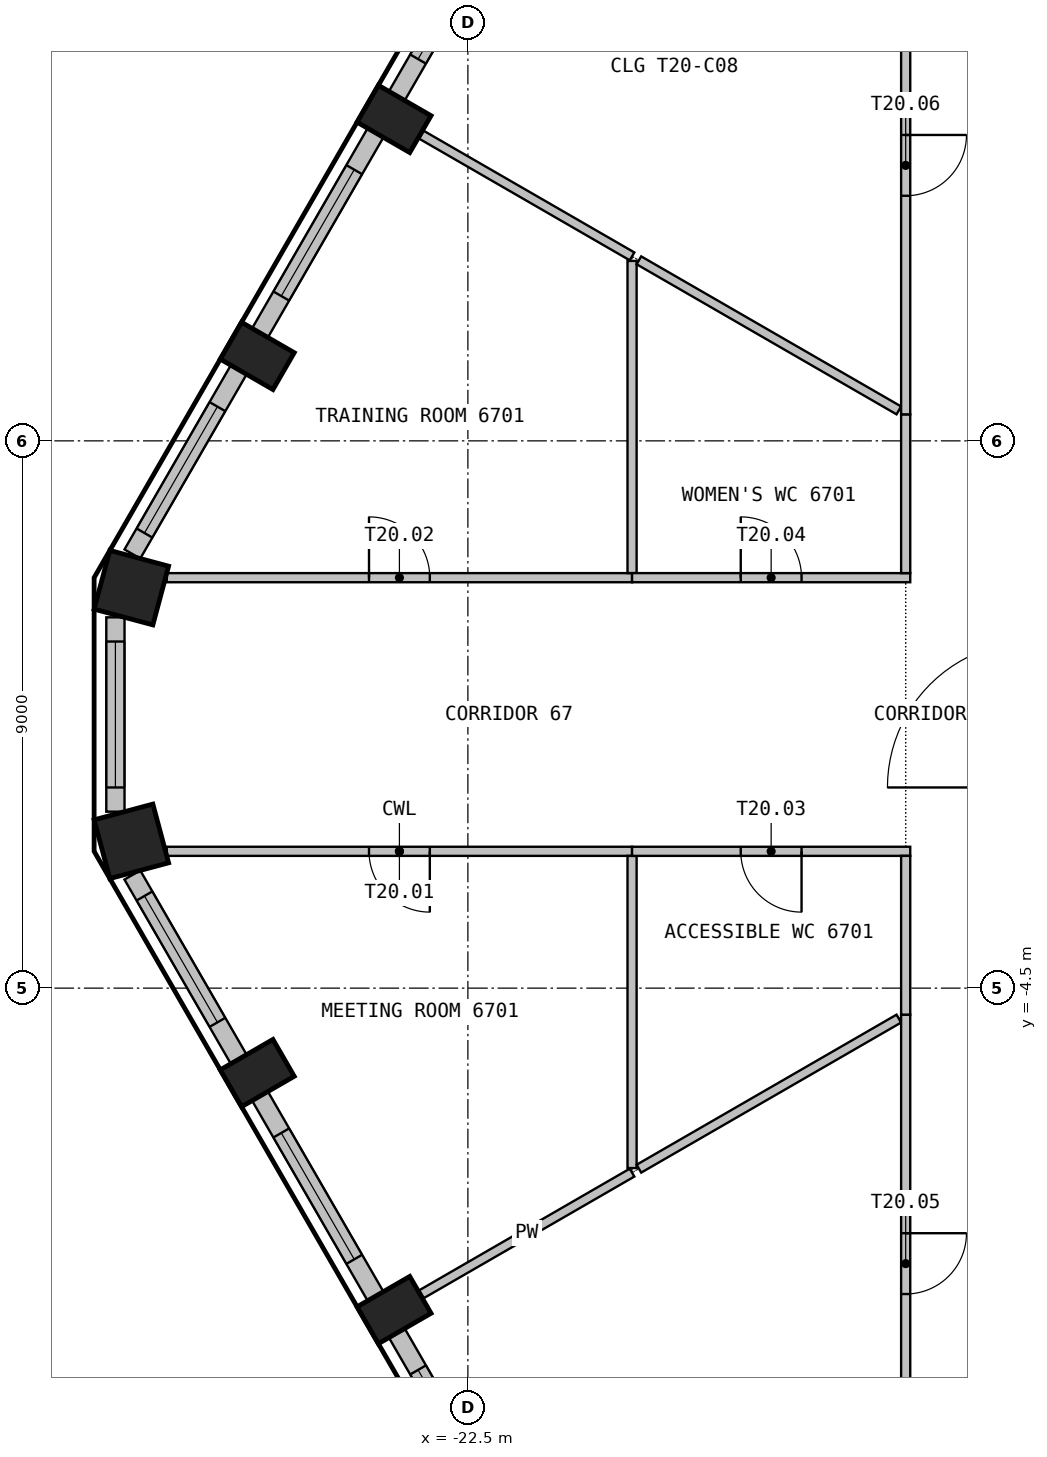
"""IFC4 building model, lengths in metres.
Left out: names, types, materials, properties, quantities, classifications, styles, units other than length and angle.
Written with IfcOpenShell. Run it as: python <this file> out.ifc"""

import sys

from ifc_helpers import new_model, si_unit, direction, frame, frame_2d, origin, origin_2d, place, context, subcontext, project, spatial, rectangle, extrude, element, fill, save


model = new_model("IFC4")
c1 = context("Model", 3, precision=1e-05, world=origin(), true_north=direction((0.0, 1.0)))
c2 = subcontext(c1, "Body", "Model", "MODEL_VIEW")
j1 = project(units=[si_unit("LENGTHUNIT", "METRE"), si_unit("PLANEANGLEUNIT", "RADIAN")], contexts=[c1])
p1 = place(None, origin())
s1 = spatial("IfcSite", under=j1, at=p1, CompositionType="ELEMENT")
p2 = place(p1, origin())
s2 = spatial("IfcBuilding", under=s1, at=p2, CompositionType="ELEMENT")
p3 = place(p2, frame((0.0, 0.0, 270.3)))
s3 = spatial("IfcBuildingStorey", under=s2, at=p3, CompositionType="ELEMENT", Elevation=270.3)
for number, where, z_axis, x_axis in (
    (1, (-23.714, 9.794, 0.0), (0.0, 0.0, 1.0), (-0.5, -0.866, 0.0)),
    (2, (-25.964, 5.897, 0.0), (0.0, 0.0, 1.0), (-0.5, -0.866, 0.0)),
):
    element("IfcColumn", number, at=place(p3, frame(where, z_axis=z_axis, x_axis=x_axis)), inside=s3, PredefinedType="COLUMN", context=c2, shape_type="SweptSolid", body=[
        extrude(rectangle(XDim=0.7, YDim=1.0, at=origin_2d()), origin(), (0.0, 0.0, 1.0), 3.575),
    ])
for number, where, z_axis, x_axis in (
    (3, (-28.035, 2.086, 0.0), (0.0, 0.0, 1.0), (-0.259, -0.966, 0.0)),
    (4, (-28.035, -2.086, 0.0), (0.0, 0.0, 1.0), (0.259, -0.966, 0.0)),
):
    element("IfcColumn", number, at=place(p3, frame(where, z_axis=z_axis, x_axis=x_axis)), inside=s3, PredefinedType="COLUMN", context=c2, shape_type="SweptSolid", body=[
        extrude(rectangle(XDim=1.0, YDim=1.0, at=origin_2d()), origin(), (0.0, 0.0, 1.0), 3.575),
    ])
for number, where, z_axis, x_axis in (
    (5, (-25.964, -5.897, 0.0), (0.0, 0.0, 1.0), (0.5, -0.866, 0.0)),
    (6, (-23.714, -9.794, 0.0), (0.0, 0.0, 1.0), (0.5, -0.866, 0.0)),
):
    element("IfcColumn", number, at=place(p3, frame(where, z_axis=z_axis, x_axis=x_axis)), inside=s3, PredefinedType="COLUMN", context=c2, shape_type="SweptSolid", body=[
        extrude(rectangle(XDim=0.7, YDim=1.0, at=origin_2d()), origin(), (0.0, 0.0, 1.0), 3.575),
    ])
p4 = place(p3, frame((-21.769, 13.463, 0.0), z_axis=(0.0, 0.0, 1.0), x_axis=(-0.499982058975, -0.866035761792, 0.0)))
e7 = element("IfcWall", 7, at=p4, inside=s3, PredefinedType="SOLIDWALL", context=c2, shape_type="SweptSolid", body=[
    extrude(rectangle(XDim=3.799, YDim=0.3, at=frame_2d((1.899, 0.0))), origin(), (0.0, 0.0, 1.0), 3.575),
])
p5 = place(p4, frame((0.699, 0.0, 0.9)))
e8 = element("IfcOpeningElement", 8, at=p5, cuts=e7, PredefinedType="OPENING", context=c2, shape_type="SweptSolid", body=[
    extrude(rectangle(XDim=2.4, YDim=2.1, at=frame_2d((1.2, 1.05))), frame((0.0, 0.16, 0.0), z_axis=(0.0, -1.0, 0.0), x_axis=(1.0, 0.0, 0.0)), (0.0, 0.0, 1.0), 0.32),
])
p6 = place(p3, frame((-24.019, 9.566, 0.0), z_axis=(0.0, 0.0, 1.0), x_axis=(-0.499982058975, -0.866035761792, 0.0)))
e9 = element("IfcWall", 9, at=p6, inside=s3, PredefinedType="SOLIDWALL", context=c2, shape_type="SweptSolid", body=[
    extrude(rectangle(XDim=3.799, YDim=0.3, at=frame_2d((1.899, 0.0))), origin(), (0.0, 0.0, 1.0), 3.575),
])
p7 = place(p6, frame((0.699, 0.0, 0.9)))
e10 = element("IfcOpeningElement", 10, at=p7, cuts=e9, PredefinedType="OPENING", context=c2, shape_type="SweptSolid", body=[
    extrude(rectangle(XDim=2.4, YDim=2.1, at=frame_2d((1.2, 1.05))), frame((0.0, 0.16, 0.0), z_axis=(0.0, -1.0, 0.0), x_axis=(1.0, 0.0, 0.0)), (0.0, 0.0, 1.0), 0.32),
])
p8 = place(p3, frame((-26.269, 5.669, 0.0), z_axis=(0.0, 0.0, 1.0), x_axis=(-0.499990325971, -0.866030989016, 0.0)))
e11 = element("IfcWall", 11, at=p8, inside=s3, PredefinedType="SOLIDWALL", context=c2, shape_type="SweptSolid", body=[
    extrude(rectangle(XDim=3.498, YDim=0.3, at=frame_2d((1.749, 0.0))), origin(), (0.0, 0.0, 1.0), 3.575),
])
p9 = place(p8, frame((0.699, 0.0, 0.9)))
e12 = element("IfcOpeningElement", 12, at=p9, cuts=e11, PredefinedType="OPENING", context=c2, shape_type="SweptSolid", body=[
    extrude(rectangle(XDim=2.4, YDim=2.1, at=frame_2d((1.2, 1.05))), frame((0.0, 0.16, 0.0), z_axis=(0.0, -1.0, 0.0), x_axis=(1.0, 0.0, 0.0)), (0.0, 0.0, 1.0), 0.32),
])
p10 = place(p3, frame((-28.297, 1.598, 0.0), z_axis=(0.0, 0.0, 1.0), x_axis=(0.0, -1.0, 0.0)))
e13 = element("IfcWall", 13, at=p10, inside=s3, PredefinedType="SOLIDWALL", context=c2, shape_type="SweptSolid", body=[
    extrude(rectangle(XDim=3.196, YDim=0.3, at=frame_2d((1.598, 0.0))), origin(), (0.0, 0.0, 1.0), 3.575),
])
p11 = place(p10, frame((0.398, 0.0, 0.9)))
e14 = element("IfcOpeningElement", 14, at=p11, cuts=e13, PredefinedType="OPENING", context=c2, shape_type="SweptSolid", body=[
    extrude(rectangle(XDim=2.4, YDim=2.1, at=frame_2d((1.2, 1.05))), frame((0.0, 0.16, 0.0), z_axis=(0.0, -1.0, 0.0), x_axis=(1.0, 0.0, 0.0)), (0.0, 0.0, 1.0), 0.32),
])
p12 = place(p3, frame((-28.018, -2.64, 0.0), z_axis=(0.0, 0.0, 1.0), x_axis=(0.499990325971, -0.866030989016, 0.0)))
e15 = element("IfcWall", 15, at=p12, inside=s3, PredefinedType="SOLIDWALL", context=c2, shape_type="SweptSolid", body=[
    extrude(rectangle(XDim=3.498, YDim=0.3, at=frame_2d((1.749, 0.0))), origin(), (0.0, 0.0, 1.0), 3.575),
])
p13 = place(p12, frame((0.398, 0.0, 0.9)))
e16 = element("IfcOpeningElement", 16, at=p13, cuts=e15, PredefinedType="OPENING", context=c2, shape_type="SweptSolid", body=[
    extrude(rectangle(XDim=2.4, YDim=2.1, at=frame_2d((1.2, 1.05))), frame((0.0, 0.16, 0.0), z_axis=(0.0, -1.0, 0.0), x_axis=(1.0, 0.0, 0.0)), (0.0, 0.0, 1.0), 0.32),
])
p14 = place(p3, frame((-25.919, -6.276, 0.0), z_axis=(0.0, 0.0, 1.0), x_axis=(0.499982058975, -0.866035761792, 0.0)))
e17 = element("IfcWall", 17, at=p14, inside=s3, PredefinedType="SOLIDWALL", context=c2, shape_type="SweptSolid", body=[
    extrude(rectangle(XDim=3.799, YDim=0.3, at=frame_2d((1.899, 0.0))), origin(), (0.0, 0.0, 1.0), 3.575),
])
p15 = place(p14, frame((0.699, 0.0, 0.9)))
e18 = element("IfcOpeningElement", 18, at=p15, cuts=e17, PredefinedType="OPENING", context=c2, shape_type="SweptSolid", body=[
    extrude(rectangle(XDim=2.4, YDim=2.1, at=frame_2d((1.2, 1.05))), frame((0.0, 0.16, 0.0), z_axis=(0.0, -1.0, 0.0), x_axis=(1.0, 0.0, 0.0)), (0.0, 0.0, 1.0), 0.32),
])
p16 = place(p3, frame((-23.669, -10.173, 0.0), z_axis=(0.0, 0.0, 1.0), x_axis=(0.499982058975, -0.866035761792, 0.0)))
e19 = element("IfcWall", 19, at=p16, inside=s3, PredefinedType="SOLIDWALL", context=c2, shape_type="SweptSolid", body=[
    extrude(rectangle(XDim=3.799, YDim=0.3, at=frame_2d((1.899, 0.0))), origin(), (0.0, 0.0, 1.0), 3.575),
])
p17 = place(p16, frame((0.699, 0.0, 0.9)))
e20 = element("IfcOpeningElement", 20, at=p17, cuts=e19, PredefinedType="OPENING", context=c2, shape_type="SweptSolid", body=[
    extrude(rectangle(XDim=2.4, YDim=2.1, at=frame_2d((1.2, 1.05))), frame((0.0, 0.16, 0.0), z_axis=(0.0, -1.0, 0.0), x_axis=(1.0, 0.0, 0.0)), (0.0, 0.0, 1.0), 0.32),
])
p18 = place(p3, frame((-19.8, -2.25, 0.0), z_axis=(0.0, 0.0, 1.0), x_axis=(-1.0, 0.0, 0.0)))
e21 = element("IfcWall", 21, at=p18, inside=s3, PredefinedType="PARTITIONING", context=c2, shape_type="SweptSolid", body=[
    extrude(rectangle(XDim=7.652, YDim=0.15, at=frame_2d((3.826, 0.0))), origin(), (0.0, 0.0, 1.0), 3.575),
])
p19 = place(p18, frame((3.326, 0.0, 0.0)))
e22 = element("IfcOpeningElement", 22, at=p19, cuts=e21, PredefinedType="OPENING", context=c2, shape_type="SweptSolid", body=[
    extrude(rectangle(XDim=1.0, YDim=2.1, at=frame_2d((0.5, 1.05))), frame((0.0, 0.085, 0.0), z_axis=(0.0, -1.0, 0.0), x_axis=(1.0, 0.0, 0.0)), (0.0, 0.0, 1.0), 0.17),
])
p20 = place(p3, frame((-27.452, 2.25, 0.0), z_axis=(0.0, 0.0, 1.0), x_axis=(1.0, 0.0, 0.0)))
e23 = element("IfcWall", 23, at=p20, inside=s3, PredefinedType="PARTITIONING", context=c2, shape_type="SweptSolid", body=[
    extrude(rectangle(XDim=7.652, YDim=0.15, at=frame_2d((3.826, 0.0))), origin(), (0.0, 0.0, 1.0), 3.575),
])
p21 = place(p20, frame((3.326, 0.0, 0.0)))
e24 = element("IfcOpeningElement", 24, at=p21, cuts=e23, PredefinedType="OPENING", context=c2, shape_type="SweptSolid", body=[
    extrude(rectangle(XDim=1.0, YDim=2.1, at=frame_2d((0.5, 1.05))), frame((0.0, 0.085, 0.0), z_axis=(0.0, -1.0, 0.0), x_axis=(1.0, 0.0, 0.0)), (0.0, 0.0, 1.0), 0.17),
])
for number, where, z_axis, x_axis in (
    (25, (-19.8, -7.534, 0.0), (0.0, 0.0, 1.0), (-0.866, -0.5, 0.0)),
    (26, (-23.264, 9.534, 0.0), (0.0, 0.0, 1.0), (0.866, -0.5, 0.0)),
):
    element("IfcWall", number, at=place(p3, frame(where, z_axis=z_axis, x_axis=x_axis)), inside=s3, PredefinedType="PARTITIONING", context=c2, shape_type="SweptSolid", body=[
        extrude(rectangle(XDim=4.0, YDim=0.15, at=frame_2d((2.0, 0.0))), origin(), (0.0, 0.0, 1.0), 3.575),
    ])
p22 = place(p3, frame((-19.8, -2.325, 0.0), z_axis=(0.0, 0.0, 1.0), x_axis=(0.0, -1.0, 0.0)))
e27 = element("IfcWall", 27, at=p22, inside=s3, PredefinedType="PARTITIONING", context=c2, shape_type="SweptSolid", body=[
    extrude(rectangle(XDim=5.134, YDim=0.15, at=frame_2d((2.567, 0.0))), origin(), (0.0, 0.0, 1.0), 3.575),
])
p23 = place(p3, frame((-15.413, -5.001, 0.0), z_axis=(0.0, 0.0, 1.0), x_axis=(-0.866034039096, -0.499985042903, 0.0)))
e28 = element("IfcWall", 28, at=p23, inside=s3, PredefinedType="PARTITIONING", context=c2, shape_type="SweptSolid", body=[
    extrude(rectangle(XDim=4.936, YDim=0.15, at=frame_2d((2.468, 0.0))), origin(), (0.0, 0.0, 1.0), 3.575),
])
p24 = place(p3, frame((-15.225, -2.25, 0.0), z_axis=(0.0, 0.0, 1.0), x_axis=(-1.0, 0.0, 0.0)))
e29 = element("IfcWall", 29, at=p24, inside=s3, PredefinedType="PARTITIONING", context=c2, shape_type="SweptSolid", body=[
    extrude(rectangle(XDim=4.575, YDim=0.15, at=frame_2d((2.288, 0.0))), origin(), (0.0, 0.0, 1.0), 3.575),
])
p25 = place(p24, frame((1.788, 0.0, 0.0)))
e30 = element("IfcOpeningElement", 30, at=p25, cuts=e29, PredefinedType="OPENING", context=c2, shape_type="SweptSolid", body=[
    extrude(rectangle(XDim=1.0, YDim=2.1, at=frame_2d((0.5, 1.05))), frame((0.0, 0.085, 0.0), z_axis=(0.0, -1.0, 0.0), x_axis=(1.0, 0.0, 0.0)), (0.0, 0.0, 1.0), 0.17),
])
p26 = place(p3, frame((-19.8, 7.459, 0.0), z_axis=(0.0, 0.0, 1.0), x_axis=(0.0, -1.0, 0.0)))
e31 = element("IfcWall", 31, at=p26, inside=s3, PredefinedType="PARTITIONING", context=c2, shape_type="SweptSolid", body=[
    extrude(rectangle(XDim=5.134, YDim=0.15, at=frame_2d((2.567, 0.0))), origin(), (0.0, 0.0, 1.0), 3.575),
])
p27 = place(p3, frame((-19.8, 2.25, 0.0), z_axis=(0.0, 0.0, 1.0), x_axis=(1.0, 0.0, 0.0)))
e32 = element("IfcWall", 32, at=p27, inside=s3, PredefinedType="PARTITIONING", context=c2, shape_type="SweptSolid", body=[
    extrude(rectangle(XDim=4.575, YDim=0.15, at=frame_2d((2.288, 0.0))), origin(), (0.0, 0.0, 1.0), 3.575),
])
p28 = place(p27, frame((1.788, 0.0, 0.0)))
e33 = element("IfcOpeningElement", 33, at=p28, cuts=e32, PredefinedType="OPENING", context=c2, shape_type="SweptSolid", body=[
    extrude(rectangle(XDim=1.0, YDim=2.1, at=frame_2d((0.5, 1.05))), frame((0.0, 0.085, 0.0), z_axis=(0.0, -1.0, 0.0), x_axis=(1.0, 0.0, 0.0)), (0.0, 0.0, 1.0), 0.17),
])
p29 = place(p3, frame((-19.688, 7.469, 0.0), z_axis=(0.0, 0.0, 1.0), x_axis=(0.866034039096, -0.499985042903, 0.0)))
e34 = element("IfcWall", 34, at=p29, inside=s3, PredefinedType="PARTITIONING", context=c2, shape_type="SweptSolid", body=[
    extrude(rectangle(XDim=4.936, YDim=0.15, at=frame_2d((2.468, 0.0))), origin(), (0.0, 0.0, 1.0), 3.575),
])
p30 = place(p3, frame((-15.3, -4.936, 0.0), z_axis=(0.0, 0.0, 1.0), x_axis=(0.0, -1.0, 0.0)))
e35 = element("IfcWall", 35, at=p30, inside=s3, PredefinedType="PARTITIONING", context=c2, shape_type="SweptSolid", body=[
    extrude(rectangle(XDim=8.189, YDim=0.15, at=frame_2d((4.094, 0.0))), origin(), (0.0, 0.0, 1.0), 3.575),
])
p31 = place(p30, frame((3.594, 0.0, 0.0)))
e36 = element("IfcOpeningElement", 36, at=p31, cuts=e35, PredefinedType="OPENING", context=c2, shape_type="SweptSolid", body=[
    extrude(rectangle(XDim=1.0, YDim=2.1, at=frame_2d((0.5, 1.05))), frame((0.0, 0.085, 0.0), z_axis=(0.0, -1.0, 0.0), x_axis=(1.0, 0.0, 0.0)), (0.0, 0.0, 1.0), 0.17),
])
for number, where, z_axis, x_axis in (
    (37, (-15.3, -2.325, 0.0), (0.0, 0.0, 1.0), (0.0, -1.0, 0.0)),
    (38, (-15.3, 4.936, 0.0), (0.0, 0.0, 1.0), (0.0, -1.0, 0.0)),
):
    element("IfcWall", number, at=place(p3, frame(where, z_axis=z_axis, x_axis=x_axis)), inside=s3, PredefinedType="PARTITIONING", context=c2, shape_type="SweptSolid", body=[
        extrude(rectangle(XDim=2.611, YDim=0.15, at=frame_2d((1.306, 0.0))), origin(), (0.0, 0.0, 1.0), 3.575),
    ])
p32 = place(p3, frame((-15.3, 13.125, 0.0), z_axis=(0.0, 0.0, 1.0), x_axis=(0.0, -1.0, 0.0)))
e39 = element("IfcWall", 39, at=p32, inside=s3, PredefinedType="PARTITIONING", context=c2, shape_type="SweptSolid", body=[
    extrude(rectangle(XDim=8.189, YDim=0.15, at=frame_2d((4.094, 0.0))), origin(), (0.0, 0.0, 1.0), 3.575),
])
p33 = place(p32, frame((3.594, 0.0, 0.0)))
e40 = element("IfcOpeningElement", 40, at=p33, cuts=e39, PredefinedType="OPENING", context=c2, shape_type="SweptSolid", body=[
    extrude(rectangle(XDim=1.0, YDim=2.1, at=frame_2d((0.5, 1.05))), frame((0.0, 0.085, 0.0), z_axis=(0.0, -1.0, 0.0), x_axis=(1.0, 0.0, 0.0)), (0.0, 0.0, 1.0), 0.17),
])
p34 = place(p5, origin())
e41 = element("IfcWindow", 41, at=p34, inside=s3, PartitioningType="SINGLE_PANEL", PredefinedType="WINDOW", context=c2, shape_type="SweptSolid", body=[
    extrude(rectangle(XDim=2.4, YDim=2.1, at=frame_2d((1.2, 1.05))), frame((0.0, 0.03, 0.0), z_axis=(0.0, -1.0, 0.0), x_axis=(1.0, 0.0, 0.0)), (0.0, 0.0, 1.0), 0.06),
])
fill(e8, e41)
p35 = place(p7, origin())
e42 = element("IfcWindow", 42, at=p35, inside=s3, PartitioningType="SINGLE_PANEL", PredefinedType="WINDOW", context=c2, shape_type="SweptSolid", body=[
    extrude(rectangle(XDim=2.4, YDim=2.1, at=frame_2d((1.2, 1.05))), frame((0.0, 0.03, 0.0), z_axis=(0.0, -1.0, 0.0), x_axis=(1.0, 0.0, 0.0)), (0.0, 0.0, 1.0), 0.06),
])
fill(e10, e42)
p36 = place(p9, origin())
e43 = element("IfcWindow", 43, at=p36, inside=s3, PartitioningType="SINGLE_PANEL", PredefinedType="WINDOW", context=c2, shape_type="SweptSolid", body=[
    extrude(rectangle(XDim=2.4, YDim=2.1, at=frame_2d((1.2, 1.05))), frame((0.0, 0.03, 0.0), z_axis=(0.0, -1.0, 0.0), x_axis=(1.0, 0.0, 0.0)), (0.0, 0.0, 1.0), 0.06),
])
fill(e12, e43)
p37 = place(p11, origin())
e44 = element("IfcWindow", 44, at=p37, inside=s3, PartitioningType="SINGLE_PANEL", PredefinedType="WINDOW", context=c2, shape_type="SweptSolid", body=[
    extrude(rectangle(XDim=2.4, YDim=2.1, at=frame_2d((1.2, 1.05))), frame((0.0, 0.03, 0.0), z_axis=(0.0, -1.0, 0.0), x_axis=(1.0, 0.0, 0.0)), (0.0, 0.0, 1.0), 0.06),
])
fill(e14, e44)
p38 = place(p13, origin())
e45 = element("IfcWindow", 45, at=p38, inside=s3, PartitioningType="SINGLE_PANEL", PredefinedType="WINDOW", context=c2, shape_type="SweptSolid", body=[
    extrude(rectangle(XDim=2.4, YDim=2.1, at=frame_2d((1.2, 1.05))), frame((0.0, 0.03, 0.0), z_axis=(0.0, -1.0, 0.0), x_axis=(1.0, 0.0, 0.0)), (0.0, 0.0, 1.0), 0.06),
])
fill(e16, e45)
p39 = place(p15, origin())
e46 = element("IfcWindow", 46, at=p39, inside=s3, PartitioningType="SINGLE_PANEL", PredefinedType="WINDOW", context=c2, shape_type="SweptSolid", body=[
    extrude(rectangle(XDim=2.4, YDim=2.1, at=frame_2d((1.2, 1.05))), frame((0.0, 0.03, 0.0), z_axis=(0.0, -1.0, 0.0), x_axis=(1.0, 0.0, 0.0)), (0.0, 0.0, 1.0), 0.06),
])
fill(e18, e46)
p40 = place(p17, origin())
e47 = element("IfcWindow", 47, at=p40, inside=s3, PartitioningType="SINGLE_PANEL", PredefinedType="WINDOW", context=c2, shape_type="SweptSolid", body=[
    extrude(rectangle(XDim=2.4, YDim=2.1, at=frame_2d((1.2, 1.05))), frame((0.0, 0.03, 0.0), z_axis=(0.0, -1.0, 0.0), x_axis=(1.0, 0.0, 0.0)), (0.0, 0.0, 1.0), 0.06),
])
fill(e20, e47)
p41 = place(p19, origin())
e48 = element("IfcDoor", 48, at=p41, inside=s3, OperationType="SINGLE_SWING_RIGHT", PredefinedType="DOOR", context=c2, shape_type="SweptSolid", body=[
    extrude(rectangle(XDim=1.0, YDim=2.1, at=frame_2d((0.5, 1.05))), frame((0.0, 0.025, 0.0), z_axis=(0.0, -1.0, 0.0), x_axis=(1.0, 0.0, 0.0)), (0.0, 0.0, 1.0), 0.05),
])
fill(e22, e48)
p42 = place(p21, origin())
e49 = element("IfcDoor", 49, at=p42, inside=s3, OperationType="SINGLE_SWING_LEFT", PredefinedType="DOOR", context=c2, shape_type="SweptSolid", body=[
    extrude(rectangle(XDim=1.0, YDim=2.1, at=frame_2d((0.5, 1.05))), frame((0.0, 0.025, 0.0), z_axis=(0.0, -1.0, 0.0), x_axis=(1.0, 0.0, 0.0)), (0.0, 0.0, 1.0), 0.05),
])
fill(e24, e49)
p43 = place(p25, origin())
e50 = element("IfcDoor", 50, at=p43, inside=s3, OperationType="SINGLE_SWING_RIGHT", PredefinedType="DOOR", context=c2, shape_type="SweptSolid", body=[
    extrude(rectangle(XDim=1.0, YDim=2.1, at=frame_2d((0.5, 1.05))), frame((0.0, 0.025, 0.0), z_axis=(0.0, -1.0, 0.0), x_axis=(1.0, 0.0, 0.0)), (0.0, 0.0, 1.0), 0.05),
])
fill(e30, e50)
p44 = place(p28, origin())
e51 = element("IfcDoor", 51, at=p44, inside=s3, OperationType="SINGLE_SWING_LEFT", PredefinedType="DOOR", context=c2, shape_type="SweptSolid", body=[
    extrude(rectangle(XDim=1.0, YDim=2.1, at=frame_2d((0.5, 1.05))), frame((0.0, 0.025, 0.0), z_axis=(0.0, -1.0, 0.0), x_axis=(1.0, 0.0, 0.0)), (0.0, 0.0, 1.0), 0.05),
])
fill(e33, e51)
p45 = place(p31, origin())
e52 = element("IfcDoor", 52, at=p45, inside=s3, OperationType="SINGLE_SWING_RIGHT", PredefinedType="DOOR", context=c2, shape_type="SweptSolid", body=[
    extrude(rectangle(XDim=1.0, YDim=2.1, at=frame_2d((0.5, 1.05))), frame((0.0, 0.025, 0.0), z_axis=(0.0, -1.0, 0.0), x_axis=(1.0, 0.0, 0.0)), (0.0, 0.0, 1.0), 0.05),
])
fill(e36, e52)
p46 = place(p33, origin())
e53 = element("IfcDoor", 53, at=p46, inside=s3, OperationType="SINGLE_SWING_RIGHT", PredefinedType="DOOR", context=c2, shape_type="SweptSolid", body=[
    extrude(rectangle(XDim=1.0, YDim=2.1, at=frame_2d((0.5, 1.05))), frame((0.0, 0.025, 0.0), z_axis=(0.0, -1.0, 0.0), x_axis=(1.0, 0.0, 0.0)), (0.0, 0.0, 1.0), 0.05),
])
fill(e40, e53)
save(model, sys.argv[1])
